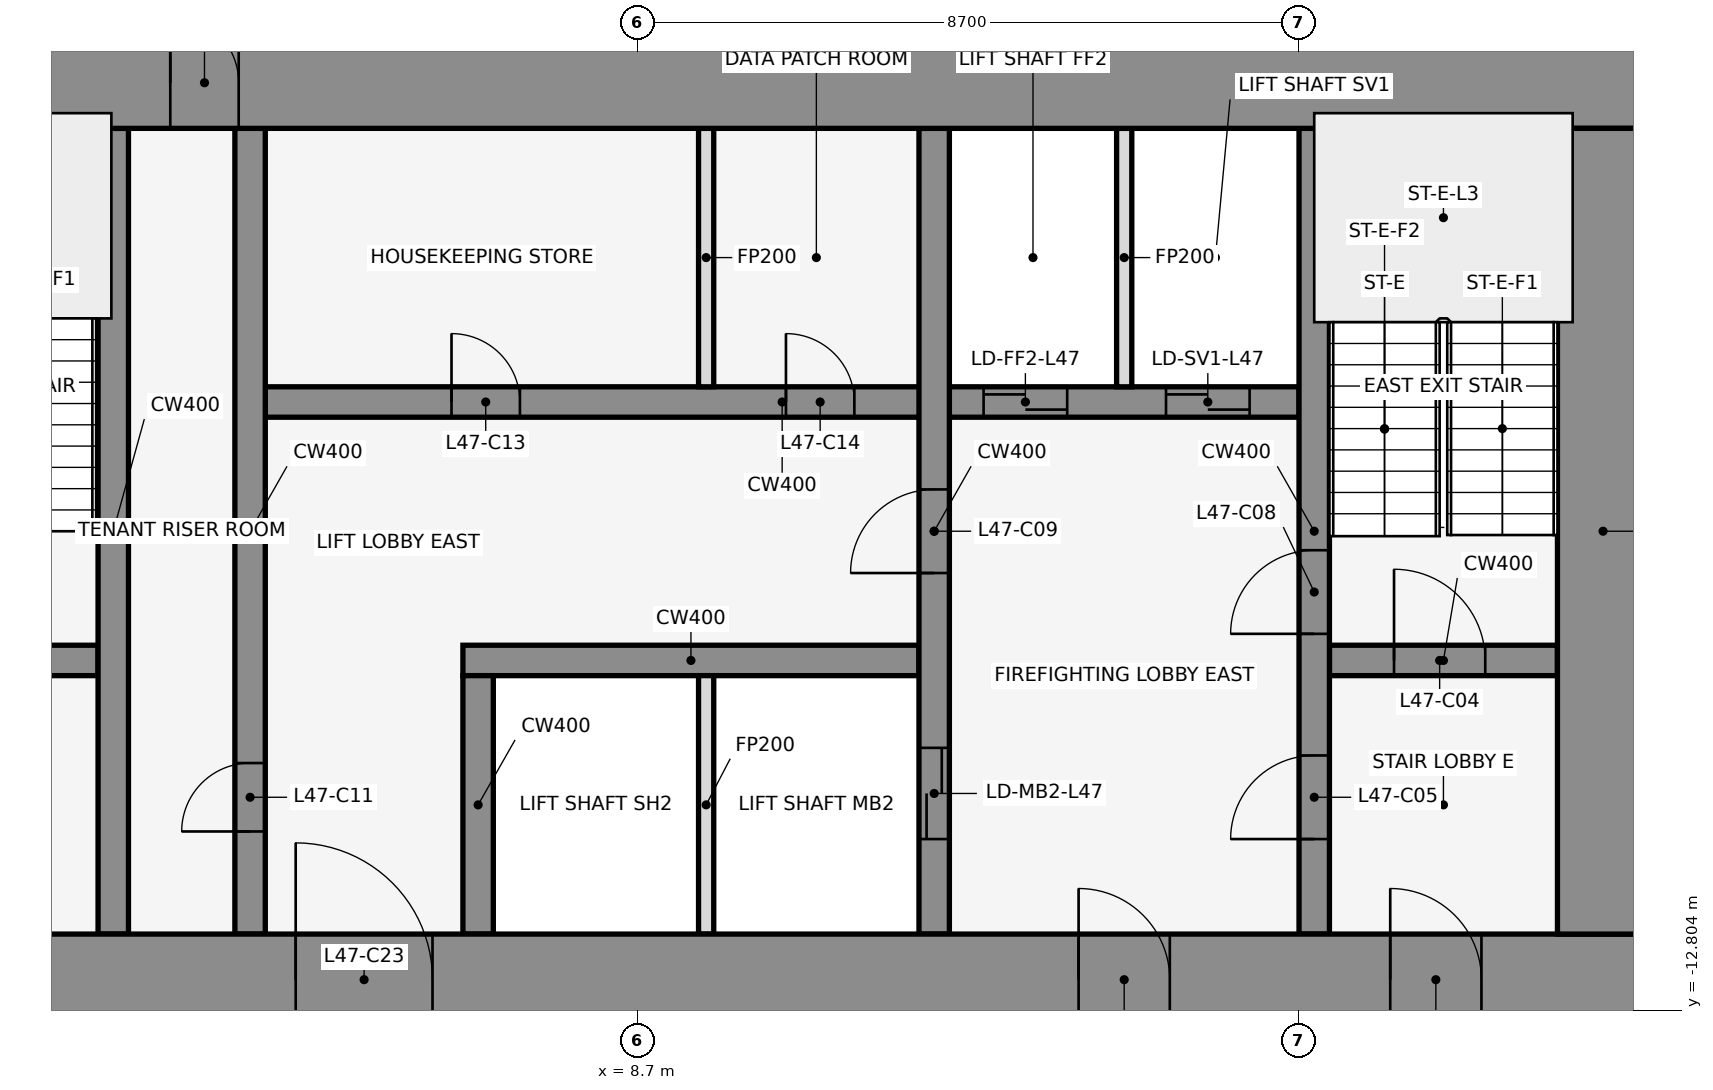
"""IFC4 building model, lengths in metres.
Left out: names, types, materials, properties, quantities, classifications, styles, units other than length and angle.
Written with IfcOpenShell. Run it as: python <this file> out.ifc"""

import sys

from ifc_helpers import new_model, si_unit, direction, frame, frame_2d, origin, place, context, subcontext, project, spatial, rectangle, extrude, element, fill, save


model = new_model("IFC4")
c1 = context("Model", 3, precision=1e-05, world=origin(), true_north=direction((0.0, 1.0)))
c2 = subcontext(c1, "Body", "Model", "MODEL_VIEW")
j1 = project(units=[si_unit("LENGTHUNIT", "METRE"), si_unit("PLANEANGLEUNIT", "RADIAN")], contexts=[c1])
p1 = place(None, origin())
s1 = spatial("IfcSite", under=j1, at=p1, CompositionType="ELEMENT")
p2 = place(p1, origin())
s2 = spatial("IfcBuilding", under=s1, at=p2, CompositionType="ELEMENT")
p3 = place(p2, frame((0.0, 0.0, 211.4)))
s3 = spatial("IfcBuildingStorey", under=s2, at=p3, CompositionType="ELEMENT", Elevation=211.4)
for number, where, z_axis, x_axis in (
    (1, (16.432, -0.105, 0.0), (0.0, 0.0, 1.0), (-0.84, 0.543, 0.0)),
    (2, (1.901, 1.08, 0.0), (0.0, 0.0, 1.0), (-0.84, -0.543, 0.0)),
):
    element("IfcWall", number, at=place(p3, frame(where, z_axis=z_axis, x_axis=x_axis)), inside=s3, PredefinedType="STANDARD", context=c2, shape_type="SweptSolid", body=[
        extrude(rectangle(XDim=2.183, YDim=0.25, at=frame_2d((1.091, 0.0))), origin(), (0.0, 0.0, 1.0), 3.95),
    ])
p4 = place(p3, frame((-1.6, -8.2, 0.0), z_axis=(0.0, 0.0, 1.0), x_axis=(1.0, 0.0, 0.0)))
e3 = element("IfcWall", 3, at=p4, inside=s3, PredefinedType="SHEAR", context=c2, shape_type="SweptSolid", body=[
    extrude(rectangle(XDim=3.2, YDim=0.4, at=frame_2d((1.6, 0.0))), origin(), (0.0, 0.0, 1.0), 4.1),
])
p5 = place(p4, frame((1.05, 0.0, 0.0)))
e4 = element("IfcOpeningElement", 4, at=p5, cuts=e3, PredefinedType="OPENING", context=c2, shape_type="SweptSolid", body=[
    extrude(rectangle(XDim=1.2, YDim=2.1, at=frame_2d((0.6, 1.05))), frame((0.0, 0.212, 0.0), z_axis=(0.0, -1.0, 0.0), x_axis=(1.0, 0.0, 0.0)), (0.0, 0.0, 1.0), 0.424),
])
p6 = place(p3, frame((6.4, -8.2, 0.0), z_axis=(0.0, 0.0, 1.0), x_axis=(1.0, 0.0, 0.0)))
e5 = element("IfcWall", 5, at=p6, inside=s3, PredefinedType="SHEAR", context=c2, shape_type="SweptSolid", body=[
    extrude(rectangle(XDim=6.0, YDim=0.4, at=frame_2d((3.0, 0.0))), origin(), (0.0, 0.0, 1.0), 4.1),
])
p7 = place(p3, frame((17.8, -8.2, 0.0), z_axis=(0.0, 0.0, 1.0), x_axis=(1.0, 0.0, 0.0)))
e6 = element("IfcWall", 6, at=p7, inside=s3, PredefinedType="SHEAR", context=c2, shape_type="SweptSolid", body=[
    extrude(rectangle(XDim=3.0, YDim=0.4, at=frame_2d((1.5, 0.0))), origin(), (0.0, 0.0, 1.0), 4.1),
])
p8 = place(p7, frame((0.85, 0.0, 0.0)))
e7 = element("IfcOpeningElement", 7, at=p8, cuts=e6, PredefinedType="OPENING", context=c2, shape_type="SweptSolid", body=[
    extrude(rectangle(XDim=1.2, YDim=2.1, at=frame_2d((0.6, 1.05))), frame((0.0, 0.212, 0.0), z_axis=(0.0, -1.0, 0.0), x_axis=(1.0, 0.0, 0.0)), (0.0, 0.0, 1.0), 0.424),
])
p9 = place(p3, frame((3.8, -4.8, 0.0), z_axis=(0.0, 0.0, 1.0), x_axis=(1.0, 0.0, 0.0)))
e8 = element("IfcWall", 8, at=p9, inside=s3, PredefinedType="SHEAR", context=c2, shape_type="SweptSolid", body=[
    extrude(rectangle(XDim=13.6, YDim=0.4, at=frame_2d((6.8, 0.0))), origin(), (0.0, 0.0, 1.0), 4.1),
])
p10 = place(p9, frame((9.45, 0.0, 0.0)))
e9 = element("IfcOpeningElement", 9, at=p10, cuts=e8, PredefinedType="OPENING", context=c2, shape_type="SweptSolid", body=[
    extrude(rectangle(XDim=1.1, YDim=2.1, at=frame_2d((0.55, 1.05))), frame((0.0, 0.212, 0.0), z_axis=(0.0, -1.0, 0.0), x_axis=(1.0, 0.0, 0.0)), (0.0, 0.0, 1.0), 0.424),
])
p11 = place(p9, frame((11.85, 0.0, 0.0)))
e10 = element("IfcOpeningElement", 10, at=p11, cuts=e8, PredefinedType="OPENING", context=c2, shape_type="SweptSolid", body=[
    extrude(rectangle(XDim=1.1, YDim=2.1, at=frame_2d((0.55, 1.05))), frame((0.0, 0.212, 0.0), z_axis=(0.0, -1.0, 0.0), x_axis=(1.0, 0.0, 0.0)), (0.0, 0.0, 1.0), 0.424),
])
p12 = place(p9, frame((2.45, 0.0, 0.0)))
e11 = element("IfcOpeningElement", 11, at=p12, cuts=e8, PredefinedType="OPENING", context=c2, shape_type="SweptSolid", body=[
    extrude(rectangle(XDim=0.9, YDim=2.1, at=frame_2d((0.45, 1.05))), frame((0.0, 0.212, 0.0), z_axis=(0.0, -1.0, 0.0), x_axis=(1.0, 0.0, 0.0)), (0.0, 0.0, 1.0), 0.424),
])
p13 = place(p9, frame((6.85, 0.0, 0.0)))
e12 = element("IfcOpeningElement", 12, at=p13, cuts=e8, PredefinedType="OPENING", context=c2, shape_type="SweptSolid", body=[
    extrude(rectangle(XDim=0.9, YDim=2.1, at=frame_2d((0.45, 1.05))), frame((0.0, 0.212, 0.0), z_axis=(0.0, -1.0, 0.0), x_axis=(1.0, 0.0, 0.0)), (0.0, 0.0, 1.0), 0.424),
])
p14 = place(p3, frame((1.8, -11.8, 0.0), z_axis=(0.0, 0.0, 1.0), x_axis=(0.0, 1.0, 0.0)))
e13 = element("IfcWall", 13, at=p14, inside=s3, PredefinedType="SHEAR", context=c2, shape_type="SweptSolid", body=[
    extrude(rectangle(XDim=10.6, YDim=0.4, at=frame_2d((5.3, 0.0))), origin(), (0.0, 0.0, 1.0), 4.1),
])
p15 = place(p3, frame((3.6, -11.8, 0.0), z_axis=(0.0, 0.0, 1.0), x_axis=(0.0, 1.0, 0.0)))
e14 = element("IfcWall", 14, at=p15, inside=s3, PredefinedType="SHEAR", context=c2, shape_type="SweptSolid", body=[
    extrude(rectangle(XDim=10.6, YDim=0.4, at=frame_2d((5.3, 0.0))), origin(), (0.0, 0.0, 1.0), 4.1),
])
p16 = place(p15, frame((1.35, 0.0, 0.0)))
e15 = element("IfcOpeningElement", 15, at=p16, cuts=e14, PredefinedType="OPENING", context=c2, shape_type="SweptSolid", body=[
    extrude(rectangle(XDim=0.9, YDim=2.1, at=frame_2d((0.45, 1.05))), frame((0.0, 0.212, 0.0), z_axis=(0.0, -1.0, 0.0), x_axis=(1.0, 0.0, 0.0)), (0.0, 0.0, 1.0), 0.424),
])
p17 = place(p3, frame((6.6, -11.8, 0.0), z_axis=(0.0, 0.0, 1.0), x_axis=(0.0, 1.0, 0.0)))
e16 = element("IfcWall", 16, at=p17, inside=s3, PredefinedType="SHEAR", context=c2, shape_type="SweptSolid", body=[
    extrude(rectangle(XDim=3.4, YDim=0.4, at=frame_2d((1.7, 0.0))), origin(), (0.0, 0.0, 1.0), 4.1),
])
for number, where, z_axis, x_axis in (
    (17, (9.6, -11.8, 0.0), (0.0, 0.0, 1.0), (0.0, 1.0, 0.0)),
    (18, (9.6, -4.6, 0.0), (0.0, 0.0, 1.0), (0.0, 1.0, 0.0)),
):
    element("IfcWall", number, at=place(p3, frame(where, z_axis=z_axis, x_axis=x_axis)), inside=s3, PredefinedType="PARTITIONING", context=c2, shape_type="SweptSolid", body=[
        extrude(rectangle(XDim=3.4, YDim=0.2, at=frame_2d((1.7, 0.0))), origin(), (0.0, 0.0, 1.0), 2.841),
    ])
p18 = place(p3, frame((12.6, -11.8, 0.0), z_axis=(0.0, 0.0, 1.0), x_axis=(0.0, 1.0, 0.0)))
e19 = element("IfcWall", 19, at=p18, inside=s3, PredefinedType="SHEAR", context=c2, shape_type="SweptSolid", body=[
    extrude(rectangle(XDim=10.6, YDim=0.4, at=frame_2d((5.3, 0.0))), origin(), (0.0, 0.0, 1.0), 4.1),
])
p19 = place(p18, frame((1.25, 0.0, 0.0)))
e20 = element("IfcOpeningElement", 20, at=p19, cuts=e19, PredefinedType="OPENING", context=c2, shape_type="SweptSolid", body=[
    extrude(rectangle(XDim=1.2, YDim=2.1, at=frame_2d((0.6, 1.05))), frame((0.0, 0.212, 0.0), z_axis=(0.0, -1.0, 0.0), x_axis=(1.0, 0.0, 0.0)), (0.0, 0.0, 1.0), 0.424),
])
p20 = place(p18, frame((4.75, 0.0, 0.0)))
e21 = element("IfcOpeningElement", 21, at=p20, cuts=e19, PredefinedType="OPENING", context=c2, shape_type="SweptSolid", body=[
    extrude(rectangle(XDim=1.1, YDim=2.1, at=frame_2d((0.55, 1.05))), frame((0.0, 0.212, 0.0), z_axis=(0.0, -1.0, 0.0), x_axis=(1.0, 0.0, 0.0)), (0.0, 0.0, 1.0), 0.424),
])
p21 = place(p3, frame((15.1, -4.6, 0.0), z_axis=(0.0, 0.0, 1.0), x_axis=(0.0, 1.0, 0.0)))
e22 = element("IfcWall", 22, at=p21, inside=s3, PredefinedType="PARTITIONING", context=c2, shape_type="SweptSolid", body=[
    extrude(rectangle(XDim=3.4, YDim=0.2, at=frame_2d((1.7, 0.0))), origin(), (0.0, 0.0, 1.0), 2.841),
])
p22 = place(p3, frame((17.6, -11.8, 0.0), z_axis=(0.0, 0.0, 1.0), x_axis=(0.0, 1.0, 0.0)))
e23 = element("IfcWall", 23, at=p22, inside=s3, PredefinedType="SHEAR", context=c2, shape_type="SweptSolid", body=[
    extrude(rectangle(XDim=10.6, YDim=0.4, at=frame_2d((5.3, 0.0))), origin(), (0.0, 0.0, 1.0), 4.1),
])
p23 = place(p22, frame((1.25, 0.0, 0.0)))
e24 = element("IfcOpeningElement", 24, at=p23, cuts=e23, PredefinedType="OPENING", context=c2, shape_type="SweptSolid", body=[
    extrude(rectangle(XDim=1.1, YDim=2.1, at=frame_2d((0.55, 1.05))), frame((0.0, 0.212, 0.0), z_axis=(0.0, -1.0, 0.0), x_axis=(1.0, 0.0, 0.0)), (0.0, 0.0, 1.0), 0.424),
])
p24 = place(p22, frame((3.95, 0.0, 0.0)))
e25 = element("IfcOpeningElement", 25, at=p24, cuts=e23, PredefinedType="OPENING", context=c2, shape_type="SweptSolid", body=[
    extrude(rectangle(XDim=1.1, YDim=2.1, at=frame_2d((0.55, 1.05))), frame((0.0, 0.212, 0.0), z_axis=(0.0, -1.0, 0.0), x_axis=(1.0, 0.0, 0.0)), (0.0, 0.0, 1.0), 0.424),
])
p25 = place(p3, frame((-22.0, -0.6, 0.0), z_axis=(0.0, 0.0, 1.0), x_axis=(1.0, 0.0, 0.0)))
e26 = element("IfcWall", 26, at=p25, inside=s3, PredefinedType="SHEAR", context=c2, shape_type="SweptSolid", body=[
    extrude(rectangle(XDim=44.0, YDim=1.2, at=frame_2d((22.0, 0.0))), origin(), (0.0, 0.0, 1.0), 4.1),
])
p26 = place(p25, frame((18.55, 0.0, 0.0)))
e27 = element("IfcOpeningElement", 27, at=p26, cuts=e26, PredefinedType="OPENING", context=c2, shape_type="SweptSolid", body=[
    extrude(rectangle(XDim=0.9, YDim=2.1, at=frame_2d((0.45, 1.05))), frame((0.0, 0.612, 0.0), z_axis=(0.0, -1.0, 0.0), x_axis=(1.0, 0.0, 0.0)), (0.0, 0.0, 1.0), 1.224),
])
p27 = place(p25, frame((24.55, 0.0, 0.0)))
e28 = element("IfcOpeningElement", 28, at=p27, cuts=e26, PredefinedType="OPENING", context=c2, shape_type="SweptSolid", body=[
    extrude(rectangle(XDim=0.9, YDim=2.1, at=frame_2d((0.45, 1.05))), frame((0.0, 0.612, 0.0), z_axis=(0.0, -1.0, 0.0), x_axis=(1.0, 0.0, 0.0)), (0.0, 0.0, 1.0), 1.224),
])
p28 = place(p3, frame((-22.0, -12.4, 0.0), z_axis=(0.0, 0.0, 1.0), x_axis=(1.0, 0.0, 0.0)))
e29 = element("IfcWall", 29, at=p28, inside=s3, PredefinedType="SHEAR", context=c2, shape_type="SweptSolid", body=[
    extrude(rectangle(XDim=44.0, YDim=1.2, at=frame_2d((22.0, 0.0))), origin(), (0.0, 0.0, 1.0), 4.1),
])
p29 = place(p28, frame((2.2, 0.0, 0.0)))
e30 = element("IfcOpeningElement", 30, at=p29, cuts=e29, PredefinedType="OPENING", context=c2, shape_type="SweptSolid", body=[
    extrude(rectangle(XDim=1.2, YDim=2.1, at=frame_2d((0.6, 1.05))), frame((0.0, 0.612, 0.0), z_axis=(0.0, -1.0, 0.0), x_axis=(1.0, 0.0, 0.0)), (0.0, 0.0, 1.0), 1.224),
])
p30 = place(p28, frame((21.4, 0.0, 0.0)))
e31 = element("IfcOpeningElement", 31, at=p30, cuts=e29, PredefinedType="OPENING", context=c2, shape_type="SweptSolid", body=[
    extrude(rectangle(XDim=1.2, YDim=2.1, at=frame_2d((0.6, 1.05))), frame((0.0, 0.612, 0.0), z_axis=(0.0, -1.0, 0.0), x_axis=(1.0, 0.0, 0.0)), (0.0, 0.0, 1.0), 1.224),
])
p31 = place(p28, frame((40.6, 0.0, 0.0)))
e32 = element("IfcOpeningElement", 32, at=p31, cuts=e29, PredefinedType="OPENING", context=c2, shape_type="SweptSolid", body=[
    extrude(rectangle(XDim=1.2, YDim=2.1, at=frame_2d((0.6, 1.05))), frame((0.0, 0.612, 0.0), z_axis=(0.0, -1.0, 0.0), x_axis=(1.0, 0.0, 0.0)), (0.0, 0.0, 1.0), 1.224),
])
p32 = place(p28, frame((16.0, 0.0, 0.0)))
e33 = element("IfcOpeningElement", 33, at=p32, cuts=e29, PredefinedType="OPENING", context=c2, shape_type="SweptSolid", body=[
    extrude(rectangle(XDim=1.8, YDim=2.1, at=frame_2d((0.9, 1.05))), frame((0.0, 0.612, 0.0), z_axis=(0.0, -1.0, 0.0), x_axis=(1.0, 0.0, 0.0)), (0.0, 0.0, 1.0), 1.224),
])
p33 = place(p28, frame((6.3, 0.0, 0.0)))
e34 = element("IfcOpeningElement", 34, at=p33, cuts=e29, PredefinedType="OPENING", context=c2, shape_type="SweptSolid", body=[
    extrude(rectangle(XDim=1.2, YDim=2.1, at=frame_2d((0.6, 1.05))), frame((0.0, 0.612, 0.0), z_axis=(0.0, -1.0, 0.0), x_axis=(1.0, 0.0, 0.0)), (0.0, 0.0, 1.0), 1.224),
])
p34 = place(p28, frame((26.2, 0.0, 0.0)))
e35 = element("IfcOpeningElement", 35, at=p34, cuts=e29, PredefinedType="OPENING", context=c2, shape_type="SweptSolid", body=[
    extrude(rectangle(XDim=1.8, YDim=2.1, at=frame_2d((0.9, 1.05))), frame((0.0, 0.612, 0.0), z_axis=(0.0, -1.0, 0.0), x_axis=(1.0, 0.0, 0.0)), (0.0, 0.0, 1.0), 1.224),
])
p35 = place(p28, frame((36.5, 0.0, 0.0)))
e36 = element("IfcOpeningElement", 36, at=p35, cuts=e29, PredefinedType="OPENING", context=c2, shape_type="SweptSolid", body=[
    extrude(rectangle(XDim=1.2, YDim=2.1, at=frame_2d((0.6, 1.05))), frame((0.0, 0.612, 0.0), z_axis=(0.0, -1.0, 0.0), x_axis=(1.0, 0.0, 0.0)), (0.0, 0.0, 1.0), 1.224),
])
p36 = place(p3, frame((21.4, -11.8, 0.0), z_axis=(0.0, 0.0, 1.0), x_axis=(0.0, 1.0, 0.0)))
e37 = element("IfcWall", 37, at=p36, inside=s3, PredefinedType="SHEAR", context=c2, shape_type="SweptSolid", body=[
    extrude(rectangle(XDim=10.6, YDim=1.2, at=frame_2d((5.3, 0.0))), origin(), (0.0, 0.0, 1.0), 4.1),
])
p37 = place(p8, origin())
e38 = element("IfcDoor", 38, at=p37, inside=s3, OperationType="SINGLE_SWING_RIGHT", PredefinedType="DOOR", context=c2, shape_type="SweptSolid", body=[
    extrude(rectangle(XDim=1.2, YDim=2.1, at=frame_2d((0.6, 1.05))), frame((0.0, 0.025, 0.0), z_axis=(0.0, -1.0, 0.0), x_axis=(1.0, 0.0, 0.0)), (0.0, 0.0, 1.0), 0.05),
])
fill(e7, e38)
p38 = place(p23, origin())
e39 = element("IfcDoor", 39, at=p38, inside=s3, OperationType="SINGLE_SWING_LEFT", PredefinedType="DOOR", context=c2, shape_type="SweptSolid", body=[
    extrude(rectangle(XDim=1.1, YDim=2.1, at=frame_2d((0.55, 1.05))), frame((0.0, 0.025, 0.0), z_axis=(0.0, -1.0, 0.0), x_axis=(1.0, 0.0, 0.0)), (0.0, 0.0, 1.0), 0.05),
])
fill(e24, e39)
p39 = place(p19, origin())
e40 = element("IfcDoor", 40, at=p39, inside=s3, OperationType="DOUBLE_DOOR_SLIDING", PredefinedType="DOOR", context=c2, shape_type="SweptSolid", body=[
    extrude(rectangle(XDim=1.2, YDim=2.1, at=frame_2d((0.6, 1.05))), frame((0.0, 0.025, 0.0), z_axis=(0.0, -1.0, 0.0), x_axis=(1.0, 0.0, 0.0)), (0.0, 0.0, 1.0), 0.05),
])
fill(e20, e40)
p40 = place(p10, origin())
e41 = element("IfcDoor", 41, at=p40, inside=s3, OperationType="DOUBLE_DOOR_SLIDING", PredefinedType="DOOR", context=c2, shape_type="SweptSolid", body=[
    extrude(rectangle(XDim=1.1, YDim=2.1, at=frame_2d((0.55, 1.05))), frame((0.0, 0.025, 0.0), z_axis=(0.0, -1.0, 0.0), x_axis=(1.0, 0.0, 0.0)), (0.0, 0.0, 1.0), 0.05),
])
fill(e9, e41)
p41 = place(p11, origin())
e42 = element("IfcDoor", 42, at=p41, inside=s3, OperationType="DOUBLE_DOOR_SLIDING", PredefinedType="DOOR", context=c2, shape_type="SweptSolid", body=[
    extrude(rectangle(XDim=1.1, YDim=2.1, at=frame_2d((0.55, 1.05))), frame((0.0, 0.025, 0.0), z_axis=(0.0, -1.0, 0.0), x_axis=(1.0, 0.0, 0.0)), (0.0, 0.0, 1.0), 0.05),
])
fill(e10, e42)
p42 = place(p24, origin())
e43 = element("IfcDoor", 43, at=p42, inside=s3, OperationType="SINGLE_SWING_RIGHT", PredefinedType="DOOR", context=c2, shape_type="SweptSolid", body=[
    extrude(rectangle(XDim=1.1, YDim=2.1, at=frame_2d((0.55, 1.05))), frame((0.0, 0.025, 0.0), z_axis=(0.0, -1.0, 0.0), x_axis=(1.0, 0.0, 0.0)), (0.0, 0.0, 1.0), 0.05),
])
fill(e25, e43)
p43 = place(p20, frame((1.1, 0.0, 0.0), z_axis=(0.0, 0.0, 1.0), x_axis=(-1.0, 0.0, 0.0)))
e44 = element("IfcDoor", 44, at=p43, inside=s3, OperationType="SINGLE_SWING_RIGHT", PredefinedType="DOOR", context=c2, shape_type="SweptSolid", body=[
    extrude(rectangle(XDim=1.1, YDim=2.1, at=frame_2d((0.55, 1.05))), frame((0.0, 0.025, 0.0), z_axis=(0.0, -1.0, 0.0), x_axis=(1.0, 0.0, 0.0)), (0.0, 0.0, 1.0), 0.05),
])
fill(e21, e44)
p44 = place(p16, origin())
e45 = element("IfcDoor", 45, at=p44, inside=s3, OperationType="SINGLE_SWING_LEFT", PredefinedType="DOOR", context=c2, shape_type="SweptSolid", body=[
    extrude(rectangle(XDim=0.9, YDim=2.1, at=frame_2d((0.45, 1.05))), frame((0.0, 0.025, 0.0), z_axis=(0.0, -1.0, 0.0), x_axis=(1.0, 0.0, 0.0)), (0.0, 0.0, 1.0), 0.05),
])
fill(e15, e45)
p45 = place(p12, origin())
e46 = element("IfcDoor", 46, at=p45, inside=s3, OperationType="SINGLE_SWING_LEFT", PredefinedType="DOOR", context=c2, shape_type="SweptSolid", body=[
    extrude(rectangle(XDim=0.9, YDim=2.1, at=frame_2d((0.45, 1.05))), frame((0.0, 0.025, 0.0), z_axis=(0.0, -1.0, 0.0), x_axis=(1.0, 0.0, 0.0)), (0.0, 0.0, 1.0), 0.05),
])
fill(e11, e46)
p46 = place(p13, origin())
e47 = element("IfcDoor", 47, at=p46, inside=s3, OperationType="SINGLE_SWING_RIGHT", PredefinedType="DOOR", context=c2, shape_type="SweptSolid", body=[
    extrude(rectangle(XDim=0.9, YDim=2.1, at=frame_2d((0.45, 1.05))), frame((0.0, 0.025, 0.0), z_axis=(0.0, -1.0, 0.0), x_axis=(1.0, 0.0, 0.0)), (0.0, 0.0, 1.0), 0.05),
])
fill(e12, e47)
p47 = place(p27, origin())
e48 = element("IfcDoor", 48, at=p47, inside=s3, OperationType="SINGLE_SWING_LEFT", PredefinedType="DOOR", context=c2, shape_type="SweptSolid", body=[
    extrude(rectangle(XDim=0.9, YDim=2.1, at=frame_2d((0.45, 1.05))), frame((0.0, 0.025, 0.0), z_axis=(0.0, -1.0, 0.0), x_axis=(1.0, 0.0, 0.0)), (0.0, 0.0, 1.0), 0.05),
])
fill(e28, e48)
p48 = place(p31, frame((1.2, 0.0, 0.0), z_axis=(0.0, 0.0, 1.0), x_axis=(-1.0, 0.0, 0.0)))
e49 = element("IfcDoor", 49, at=p48, inside=s3, OperationType="SINGLE_SWING_RIGHT", PredefinedType="DOOR", context=c2, shape_type="SweptSolid", body=[
    extrude(rectangle(XDim=1.2, YDim=2.1, at=frame_2d((0.6, 1.05))), frame((0.0, 0.025, 0.0), z_axis=(0.0, -1.0, 0.0), x_axis=(1.0, 0.0, 0.0)), (0.0, 0.0, 1.0), 0.05),
])
fill(e32, e49)
p49 = place(p34, origin())
e50 = element("IfcDoor", 50, at=p49, inside=s3, OperationType="SINGLE_SWING_LEFT", PredefinedType="DOOR", context=c2, shape_type="SweptSolid", body=[
    extrude(rectangle(XDim=1.8, YDim=2.1, at=frame_2d((0.9, 1.05))), frame((0.0, 0.025, 0.0), z_axis=(0.0, -1.0, 0.0), x_axis=(1.0, 0.0, 0.0)), (0.0, 0.0, 1.0), 0.05),
])
fill(e35, e50)
p50 = place(p35, frame((1.2, 0.0, 0.0), z_axis=(0.0, 0.0, 1.0), x_axis=(-1.0, 0.0, 0.0)))
e51 = element("IfcDoor", 51, at=p50, inside=s3, OperationType="SINGLE_SWING_RIGHT", PredefinedType="DOOR", context=c2, shape_type="SweptSolid", body=[
    extrude(rectangle(XDim=1.2, YDim=2.1, at=frame_2d((0.6, 1.05))), frame((0.0, 0.025, 0.0), z_axis=(0.0, -1.0, 0.0), x_axis=(1.0, 0.0, 0.0)), (0.0, 0.0, 1.0), 0.05),
])
fill(e36, e51)
save(model, sys.argv[1])
